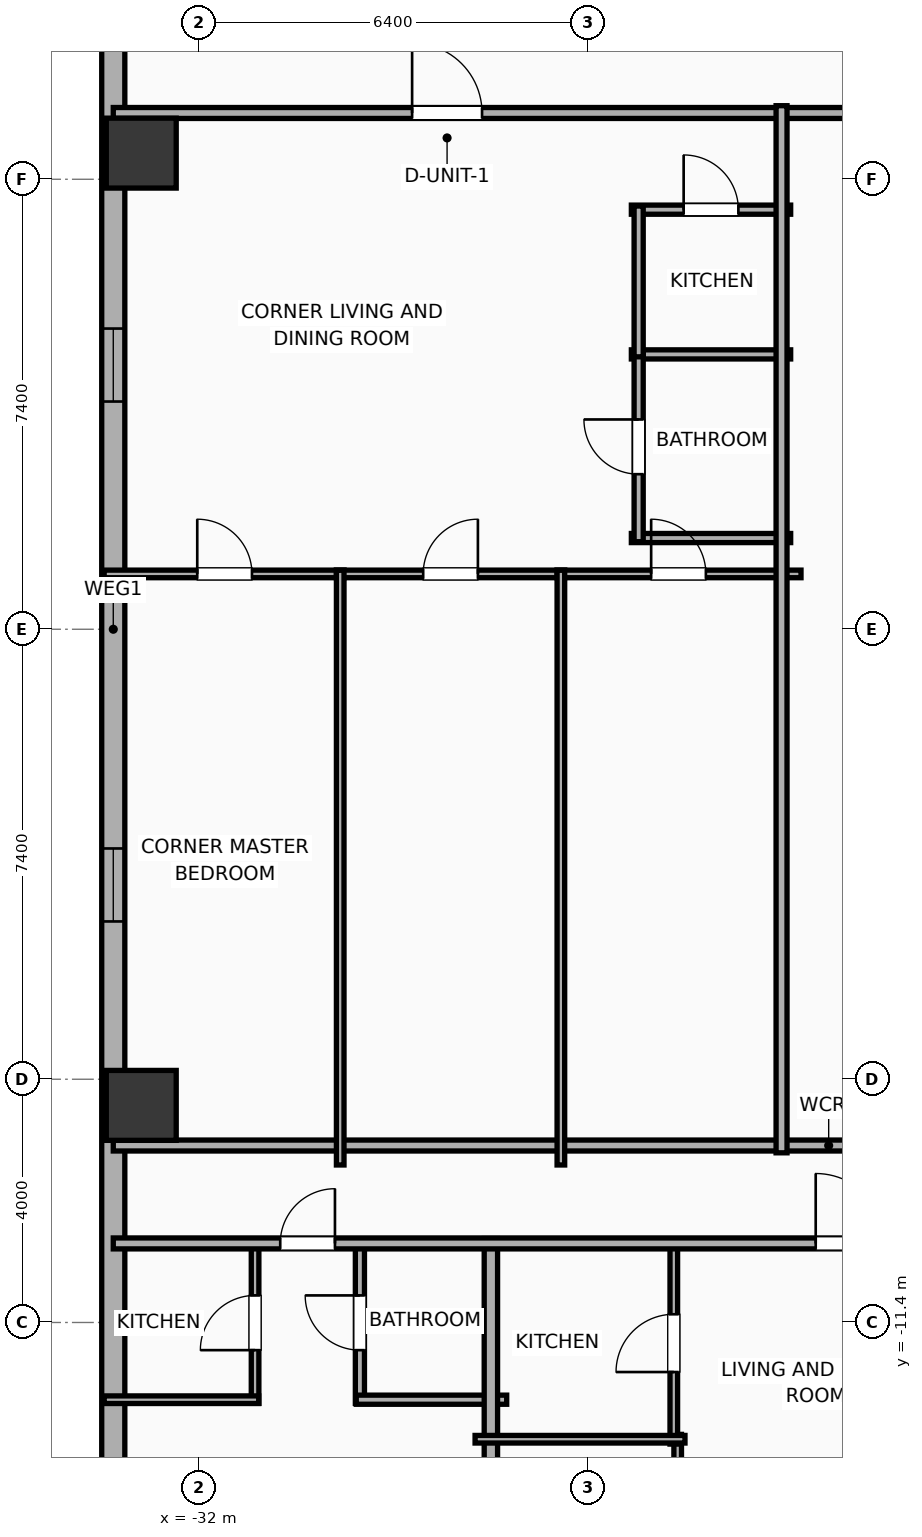
"""IFC4 building model, lengths in metres.
Left out: names, types, materials, properties, quantities, classifications, styles, units other than length and angle.
Written with IfcOpenShell. Run it as: python <this file> out.ifc"""

import sys

from ifc_helpers import new_model, si_unit, direction, frame, frame_2d, origin, origin_2d, place, context, subcontext, project, spatial, rectangle, hollow_rectangle, extrude, element, fill, save


model = new_model("IFC4")
c1 = context("Model", 3, precision=1e-05, world=origin(), true_north=direction((0.0, 1.0)))
c2 = subcontext(c1, "Body", "Model", "MODEL_VIEW")
j1 = project(units=[si_unit("LENGTHUNIT", "METRE"), si_unit("PLANEANGLEUNIT", "RADIAN")], contexts=[c1])
p1 = place(None, origin())
s1 = spatial("IfcSite", under=j1, at=p1, CompositionType="ELEMENT")
p2 = place(p1, origin())
s2 = spatial("IfcBuilding", under=s1, at=p2, CompositionType="ELEMENT")
p3 = place(p2, frame((0.0, 0.0, 37.7)))
s3 = spatial("IfcBuildingStorey", under=s2, at=p3, CompositionType="ELEMENT", Elevation=37.7)
for number, where, z_axis, x_axis in (
    (1, (-32.95, 7.83, 0.0), (0.0, 0.0, 1.0), (1.0, 0.0, 0.0)),
    (2, (-32.95, -7.83, 0.0), (0.0, 0.0, 1.0), (1.0, 0.0, 0.0)),
):
    element("IfcColumn", number, at=place(p3, frame(where, z_axis=z_axis, x_axis=x_axis)), inside=s3, PredefinedType="COLUMN", context=c2, shape_type="SweptSolid", body=[
        extrude(hollow_rectangle(XDim=1.15, YDim=1.15, WallThickness=0.04, at=origin_2d()), origin(), (0.0, 0.0, 1.0), 3.9),
    ])
p4 = place(p3, frame((-33.41, -18.381, 0.0), z_axis=(0.0, 0.0, 1.0), x_axis=(0.0, 1.0, 0.0)))
e3 = element("IfcWall", 3, at=p4, inside=s3, PredefinedType="ELEMENTEDWALL", context=c2, shape_type="SweptSolid", body=[
    extrude(rectangle(XDim=36.763, YDim=0.38, at=frame_2d((18.381, 0.0))), origin(), (0.0, 0.0, 1.0), 3.65),
])
p5 = place(p4, frame((33.187, 0.0, 0.75)))
e4 = element("IfcOpeningElement", 4, at=p5, cuts=e3, PredefinedType="OPENING", context=c2, shape_type="SweptSolid", body=[
    extrude(rectangle(XDim=1.2, YDim=2.05, at=frame_2d((0.6, 1.025))), frame((0.0, 0.2, 0.0), z_axis=(0.0, -1.0, 0.0), x_axis=(1.0, 0.0, 0.0)), (0.0, 0.0, 1.0), 0.4),
])
p6 = place(p4, frame((22.126, 0.0, 0.75)))
e5 = element("IfcOpeningElement", 5, at=p6, cuts=e3, PredefinedType="OPENING", context=c2, shape_type="SweptSolid", body=[
    extrude(rectangle(XDim=1.2, YDim=2.05, at=frame_2d((0.6, 1.025))), frame((0.0, 0.2, 0.0), z_axis=(0.0, -1.0, 0.0), x_axis=(1.0, 0.0, 0.0)), (0.0, 0.0, 1.0), 0.4),
])
p7 = place(p4, frame((13.576, 0.0, 0.75)))
e6 = element("IfcOpeningElement", 6, at=p7, cuts=e3, PredefinedType="OPENING", context=c2, shape_type="SweptSolid", body=[
    extrude(rectangle(XDim=1.2, YDim=2.05, at=frame_2d((0.6, 1.025))), frame((0.0, 0.2, 0.0), z_axis=(0.0, -1.0, 0.0), x_axis=(1.0, 0.0, 0.0)), (0.0, 0.0, 1.0), 0.4),
])
p8 = place(p3, frame((-33.41, 8.49, 0.0), z_axis=(0.0, 0.0, 1.0), x_axis=(1.0, 0.0, 0.0)))
e7 = element("IfcWall", 7, at=p8, inside=s3, PredefinedType="PARTITIONING", context=c2, shape_type="SweptSolid", body=[
    extrude(rectangle(XDim=23.53, YDim=0.18, at=frame_2d((11.765, 0.0))), origin(), (0.0, 0.0, 1.0), 3.65),
])
p9 = place(p8, frame((4.915, 0.0, 0.0)))
e8 = element("IfcOpeningElement", 8, at=p9, cuts=e7, PredefinedType="OPENING", context=c2, shape_type="SweptSolid", body=[
    extrude(rectangle(XDim=1.15, YDim=2.05, at=frame_2d((0.575, 1.025))), frame((0.0, 0.1, 0.0), z_axis=(0.0, -1.0, 0.0), x_axis=(1.0, 0.0, 0.0)), (0.0, 0.0, 1.0), 0.2),
])
p10 = place(p3, frame((-33.41, -8.49, 0.0), z_axis=(0.0, 0.0, 1.0), x_axis=(1.0, 0.0, 0.0)))
e9 = element("IfcWall", 9, at=p10, inside=s3, PredefinedType="PARTITIONING", context=c2, shape_type="SweptSolid", body=[
    extrude(rectangle(XDim=23.53, YDim=0.18, at=frame_2d((11.765, 0.0))), origin(), (0.0, 0.0, 1.0), 3.65),
])
p11 = place(p3, frame((-31.078, -12.73, 0.0), z_axis=(0.0, 0.0, 1.0), x_axis=(0.0, 1.0, 0.0)))
e10 = element("IfcWall", 10, at=p11, inside=s3, PredefinedType="PARTITIONING", context=c2, shape_type="SweptSolid", body=[
    extrude(rectangle(XDim=2.65, YDim=0.125, at=frame_2d((1.325, 0.0))), origin(), (0.0, 0.0, 1.0), 3.65),
])
p12 = place(p11, frame((0.875, 0.0, 0.0)))
e11 = element("IfcOpeningElement", 11, at=p12, cuts=e10, PredefinedType="OPENING", context=c2, shape_type="SweptSolid", body=[
    extrude(rectangle(XDim=0.9, YDim=2.05, at=frame_2d((0.45, 1.025))), frame((0.0, 0.073, 0.0), z_axis=(0.0, -1.0, 0.0), x_axis=(1.0, 0.0, 0.0)), (0.0, 0.0, 1.0), 0.145),
])
p13 = place(p3, frame((-29.354, -12.73, 0.0), z_axis=(0.0, 0.0, 1.0), x_axis=(0.0, 1.0, 0.0)))
e12 = element("IfcWall", 12, at=p13, inside=s3, PredefinedType="PLUMBINGWALL", context=c2, shape_type="SweptSolid", body=[
    extrude(rectangle(XDim=2.65, YDim=0.15, at=frame_2d((1.325, 0.0))), origin(), (0.0, 0.0, 1.0), 3.65),
])
p14 = place(p13, frame((0.875, 0.0, 0.0)))
e13 = element("IfcOpeningElement", 13, at=p14, cuts=e12, PredefinedType="OPENING", context=c2, shape_type="SweptSolid", body=[
    extrude(rectangle(XDim=0.9, YDim=2.05, at=frame_2d((0.45, 1.025))), frame((0.0, 0.085, 0.0), z_axis=(0.0, -1.0, 0.0), x_axis=(1.0, 0.0, 0.0)), (0.0, 0.0, 1.0), 0.17),
])
p15 = place(p3, frame((-33.56, -12.67, 0.0), z_axis=(0.0, 0.0, 1.0), x_axis=(1.0, 0.0, 0.0)))
e14 = element("IfcWall", 14, at=p15, inside=s3, PredefinedType="PARTITIONING", context=c2, shape_type="SweptSolid", body=[
    extrude(rectangle(XDim=2.542, YDim=0.125, at=frame_2d((1.271, 0.0))), origin(), (0.0, 0.0, 1.0), 3.65),
])
p16 = place(p3, frame((-29.414, -12.67, 0.0), z_axis=(0.0, 0.0, 1.0), x_axis=(1.0, 0.0, 0.0)))
e15 = element("IfcWall", 15, at=p16, inside=s3, PredefinedType="PLUMBINGWALL", context=c2, shape_type="SweptSolid", body=[
    extrude(rectangle(XDim=2.474, YDim=0.15, at=frame_2d((1.237, 0.0))), origin(), (0.0, 0.0, 1.0), 3.65),
])
p17 = place(p3, frame((-27.2, -22.21, 0.0), z_axis=(0.0, 0.0, 1.0), x_axis=(0.0, 1.0, 0.0)))
e16 = element("IfcWall", 16, at=p17, inside=s3, PredefinedType="PARTITIONING", context=c2, shape_type="SweptSolid", body=[
    extrude(rectangle(XDim=12.19, YDim=0.22, at=frame_2d((6.095, 0.0))), origin(), (0.0, 0.0, 1.0), 3.65),
])
p18 = place(p3, frame((-24.128, -22.36, 0.0), z_axis=(0.0, 0.0, 1.0), x_axis=(0.0, 1.0, 0.0)))
e17 = element("IfcWall", 17, at=p18, inside=s3, PredefinedType="PARTITIONING", context=c2, shape_type="SweptSolid", body=[
    extrude(rectangle(XDim=9.12, YDim=0.125, at=frame_2d((4.56, 0.0))), origin(), (0.0, 0.0, 1.0), 3.65),
])
p19 = place(p18, frame((7.186, 0.0, 0.0)))
e18 = element("IfcOpeningElement", 18, at=p19, cuts=e17, PredefinedType="OPENING", context=c2, shape_type="SweptSolid", body=[
    extrude(rectangle(XDim=0.95, YDim=2.05, at=frame_2d((0.475, 1.025))), frame((0.0, 0.073, 0.0), z_axis=(0.0, -1.0, 0.0), x_axis=(1.0, 0.0, 0.0)), (0.0, 0.0, 1.0), 0.145),
])
p20 = place(p3, frame((-24.192, -13.4, 0.0), z_axis=(0.0, 0.0, 1.0), x_axis=(0.0, 1.0, 0.0)))
e19 = element("IfcWall", 19, at=p20, inside=s3, PredefinedType="PARTITIONING", context=c2, shape_type="SweptSolid", body=[
    extrude(rectangle(XDim=3.32, YDim=0.125, at=frame_2d((1.66, 0.0))), origin(), (0.0, 0.0, 1.0), 3.65),
])
p21 = place(p20, frame((1.185, 0.0, 0.0)))
e20 = element("IfcOpeningElement", 20, at=p21, cuts=e19, PredefinedType="OPENING", context=c2, shape_type="SweptSolid", body=[
    extrude(rectangle(XDim=0.95, YDim=2.05, at=frame_2d((0.475, 1.025))), frame((0.0, 0.073, 0.0), z_axis=(0.0, -1.0, 0.0), x_axis=(1.0, 0.0, 0.0)), (0.0, 0.0, 1.0), 0.145),
])
p22 = place(p3, frame((-27.46, -13.32, 0.0), z_axis=(0.0, 0.0, 1.0), x_axis=(1.0, 0.0, 0.0)))
e21 = element("IfcWall", 21, at=p22, inside=s3, PredefinedType="PARTITIONING", context=c2, shape_type="SweptSolid", body=[
    extrude(rectangle(XDim=3.452, YDim=0.125, at=frame_2d((1.726, 0.0))), origin(), (0.0, 0.0, 1.0), 3.65),
])
p23 = place(p3, frame((-33.41, -10.1, 0.0), z_axis=(0.0, 0.0, 1.0), x_axis=(1.0, 0.0, 0.0)))
e22 = element("IfcWall", 22, at=p23, inside=s3, PredefinedType="PARTITIONING", context=c2, shape_type="SweptSolid", body=[
    extrude(rectangle(XDim=59.62, YDim=0.18, at=frame_2d((29.81, 0.0))), origin(), (0.0, 0.0, 1.0), 3.65),
])
p24 = place(p23, frame((2.746, 0.0, 0.0)))
e23 = element("IfcOpeningElement", 23, at=p24, cuts=e22, PredefinedType="OPENING", context=c2, shape_type="SweptSolid", body=[
    extrude(rectangle(XDim=0.9, YDim=2.05, at=frame_2d((0.45, 1.025))), frame((0.0, 0.1, 0.0), z_axis=(0.0, -1.0, 0.0), x_axis=(1.0, 0.0, 0.0)), (0.0, 0.0, 1.0), 0.2),
])
p25 = place(p23, frame((11.552, 0.0, 0.0)))
e24 = element("IfcOpeningElement", 24, at=p25, cuts=e22, PredefinedType="OPENING", context=c2, shape_type="SweptSolid", body=[
    extrude(rectangle(XDim=1.15, YDim=2.05, at=frame_2d((0.575, 1.025))), frame((0.0, 0.1, 0.0), z_axis=(0.0, -1.0, 0.0), x_axis=(1.0, 0.0, 0.0)), (0.0, 0.0, 1.0), 0.2),
])
p26 = place(p23, frame((22.379, 0.0, 0.0)))
e25 = element("IfcOpeningElement", 25, at=p26, cuts=e22, PredefinedType="OPENING", context=c2, shape_type="SweptSolid", body=[
    extrude(rectangle(XDim=1.15, YDim=2.05, at=frame_2d((0.575, 1.025))), frame((0.0, 0.1, 0.0), z_axis=(0.0, -1.0, 0.0), x_axis=(1.0, 0.0, 0.0)), (0.0, 0.0, 1.0), 0.2),
])
p27 = place(p23, frame((31.28, 0.0, 0.0)))
e26 = element("IfcOpeningElement", 26, at=p27, cuts=e22, PredefinedType="OPENING", context=c2, shape_type="SweptSolid", body=[
    extrude(rectangle(XDim=1.15, YDim=2.05, at=frame_2d((0.575, 1.025))), frame((0.0, 0.1, 0.0), z_axis=(0.0, -1.0, 0.0), x_axis=(1.0, 0.0, 0.0)), (0.0, 0.0, 1.0), 0.2),
])
p28 = place(p23, frame((36.02, 0.0, 0.0)))
e27 = element("IfcOpeningElement", 27, at=p28, cuts=e22, PredefinedType="OPENING", context=c2, shape_type="SweptSolid", body=[
    extrude(rectangle(XDim=0.9, YDim=2.05, at=frame_2d((0.45, 1.025))), frame((0.0, 0.1, 0.0), z_axis=(0.0, -1.0, 0.0), x_axis=(1.0, 0.0, 0.0)), (0.0, 0.0, 1.0), 0.2),
])
p29 = place(p23, frame((40.044, 0.0, 0.0)))
e28 = element("IfcOpeningElement", 28, at=p29, cuts=e22, PredefinedType="OPENING", context=c2, shape_type="SweptSolid", body=[
    extrude(rectangle(XDim=1.15, YDim=2.05, at=frame_2d((0.575, 1.025))), frame((0.0, 0.1, 0.0), z_axis=(0.0, -1.0, 0.0), x_axis=(1.0, 0.0, 0.0)), (0.0, 0.0, 1.0), 0.2),
])
p30 = place(p23, frame((45.613, 0.0, 0.0)))
e29 = element("IfcOpeningElement", 29, at=p30, cuts=e22, PredefinedType="OPENING", context=c2, shape_type="SweptSolid", body=[
    extrude(rectangle(XDim=1.15, YDim=2.05, at=frame_2d((0.575, 1.025))), frame((0.0, 0.1, 0.0), z_axis=(0.0, -1.0, 0.0), x_axis=(1.0, 0.0, 0.0)), (0.0, 0.0, 1.0), 0.2),
])
p31 = place(p23, frame((54.174, 0.0, 0.0)))
e30 = element("IfcOpeningElement", 30, at=p31, cuts=e22, PredefinedType="OPENING", context=c2, shape_type="SweptSolid", body=[
    extrude(rectangle(XDim=1.15, YDim=2.05, at=frame_2d((0.575, 1.025))), frame((0.0, 0.1, 0.0), z_axis=(0.0, -1.0, 0.0), x_axis=(1.0, 0.0, 0.0)), (0.0, 0.0, 1.0), 0.2),
])
p32 = place(p3, frame((-24.89, 6.9, 0.0), z_axis=(0.0, 0.0, 1.0), x_axis=(1.0, 0.0, 0.0)))
e31 = element("IfcWall", 31, at=p32, inside=s3, PredefinedType="PLUMBINGWALL", context=c2, shape_type="SweptSolid", body=[
    extrude(rectangle(XDim=2.62, YDim=0.15, at=frame_2d((1.31, 0.0))), origin(), (0.0, 0.0, 1.0), 3.65),
])
p33 = place(p32, frame((0.86, 0.0, 0.0)))
e32 = element("IfcOpeningElement", 32, at=p33, cuts=e31, PredefinedType="OPENING", context=c2, shape_type="SweptSolid", body=[
    extrude(rectangle(XDim=0.9, YDim=2.05, at=frame_2d((0.45, 1.025))), frame((0.0, 0.085, 0.0), z_axis=(0.0, -1.0, 0.0), x_axis=(1.0, 0.0, 0.0)), (0.0, 0.0, 1.0), 0.17),
])
for number, where, z_axis, x_axis in (
    (33, (-24.89, 4.52, 0.0), (0.0, 0.0, 1.0), (1.0, 0.0, 0.0)),
    (34, (-24.89, 1.5, 0.0), (0.0, 0.0, 1.0), (1.0, 0.0, 0.0)),
):
    element("IfcWall", number, at=place(p3, frame(where, z_axis=z_axis, x_axis=x_axis)), inside=s3, PredefinedType="PLUMBINGWALL", context=c2, shape_type="SweptSolid", body=[
        extrude(rectangle(XDim=2.62, YDim=0.15, at=frame_2d((1.31, 0.0))), origin(), (0.0, 0.0, 1.0), 3.65),
    ])
p34 = place(p3, frame((-24.77, 1.44, 0.0), z_axis=(0.0, 0.0, 1.0), x_axis=(0.0, 1.0, 0.0)))
e35 = element("IfcWall", 35, at=p34, inside=s3, PredefinedType="PLUMBINGWALL", context=c2, shape_type="SweptSolid", body=[
    extrude(rectangle(XDim=3.12, YDim=0.15, at=frame_2d((1.56, 0.0))), origin(), (0.0, 0.0, 1.0), 3.65),
])
p35 = place(p34, frame((1.11, 0.0, 0.0)))
e36 = element("IfcOpeningElement", 36, at=p35, cuts=e35, PredefinedType="OPENING", context=c2, shape_type="SweptSolid", body=[
    extrude(rectangle(XDim=0.9, YDim=2.05, at=frame_2d((0.45, 1.025))), frame((0.0, 0.085, 0.0), z_axis=(0.0, -1.0, 0.0), x_axis=(1.0, 0.0, 0.0)), (0.0, 0.0, 1.0), 0.17),
])
p36 = place(p3, frame((-24.77, 4.48, 0.0), z_axis=(0.0, 0.0, 1.0), x_axis=(0.0, 1.0, 0.0)))
e37 = element("IfcWall", 37, at=p36, inside=s3, PredefinedType="PLUMBINGWALL", context=c2, shape_type="SweptSolid", body=[
    extrude(rectangle(XDim=2.48, YDim=0.15, at=frame_2d((1.24, 0.0))), origin(), (0.0, 0.0, 1.0), 3.65),
])
p37 = place(p3, frame((-33.56, 0.91, 0.0), z_axis=(0.0, 0.0, 1.0), x_axis=(1.0, 0.0, 0.0)))
e38 = element("IfcWall", 38, at=p37, inside=s3, PredefinedType="PARTITIONING", context=c2, shape_type="SweptSolid", body=[
    extrude(rectangle(XDim=3.945, YDim=0.125, at=frame_2d((1.972, 0.0))), origin(), (0.0, 0.0, 1.0), 3.65),
])
p38 = place(p37, frame((1.531, 0.0, 0.0)))
e39 = element("IfcOpeningElement", 39, at=p38, cuts=e38, PredefinedType="OPENING", context=c2, shape_type="SweptSolid", body=[
    extrude(rectangle(XDim=0.9, YDim=2.05, at=frame_2d((0.45, 1.025))), frame((0.0, 0.073, 0.0), z_axis=(0.0, -1.0, 0.0), x_axis=(1.0, 0.0, 0.0)), (0.0, 0.0, 1.0), 0.145),
])
p39 = place(p3, frame((-29.74, 0.91, 0.0), z_axis=(0.0, 0.0, 1.0), x_axis=(1.0, 0.0, 0.0)))
e40 = element("IfcWall", 40, at=p39, inside=s3, PredefinedType="PARTITIONING", context=c2, shape_type="SweptSolid", body=[
    extrude(rectangle(XDim=3.754, YDim=0.125, at=frame_2d((1.877, 0.0))), origin(), (0.0, 0.0, 1.0), 3.65),
])
p40 = place(p39, frame((1.427, 0.0, 0.0)))
e41 = element("IfcOpeningElement", 41, at=p40, cuts=e40, PredefinedType="OPENING", context=c2, shape_type="SweptSolid", body=[
    extrude(rectangle(XDim=0.9, YDim=2.05, at=frame_2d((0.45, 1.025))), frame((0.0, 0.073, 0.0), z_axis=(0.0, -1.0, 0.0), x_axis=(1.0, 0.0, 0.0)), (0.0, 0.0, 1.0), 0.145),
])
p41 = place(p3, frame((-26.112, 0.91, 0.0), z_axis=(0.0, 0.0, 1.0), x_axis=(1.0, 0.0, 0.0)))
e42 = element("IfcWall", 42, at=p41, inside=s3, PredefinedType="PARTITIONING", context=c2, shape_type="SweptSolid", body=[
    extrude(rectangle(XDim=4.011, YDim=0.125, at=frame_2d((2.006, 0.0))), origin(), (0.0, 0.0, 1.0), 3.65),
])
p42 = place(p41, frame((1.547, 0.0, 0.0)))
e43 = element("IfcOpeningElement", 43, at=p42, cuts=e42, PredefinedType="OPENING", context=c2, shape_type="SweptSolid", body=[
    extrude(rectangle(XDim=0.9, YDim=2.05, at=frame_2d((0.45, 1.025))), frame((0.0, 0.073, 0.0), z_axis=(0.0, -1.0, 0.0), x_axis=(1.0, 0.0, 0.0)), (0.0, 0.0, 1.0), 0.145),
])
for number, where, z_axis, x_axis in (
    (44, (-26.049, -8.81, 0.0), (0.0, 0.0, 1.0), (0.0, 1.0, 0.0)),
    (45, (-29.678, -8.81, 0.0), (0.0, 0.0, 1.0), (0.0, 1.0, 0.0)),
):
    element("IfcWall", number, at=place(p3, frame(where, z_axis=z_axis, x_axis=x_axis)), inside=s3, PredefinedType="PARTITIONING", context=c2, shape_type="SweptSolid", body=[
        extrude(rectangle(XDim=9.78, YDim=0.125, at=frame_2d((4.89, 0.0))), origin(), (0.0, 0.0, 1.0), 3.65),
    ])
p43 = place(p3, frame((-22.42, -8.61, 0.0), z_axis=(0.0, 0.0, 1.0), x_axis=(0.0, 1.0, 0.0)))
e46 = element("IfcWall", 46, at=p43, inside=s3, PredefinedType="PARTITIONING", context=c2, shape_type="SweptSolid", body=[
    extrude(rectangle(XDim=17.22, YDim=0.18, at=frame_2d((8.61, 0.0))), origin(), (0.0, 0.0, 1.0), 3.65),
])
p44 = place(p6, origin())
e47 = element("IfcWindow", 47, at=p44, inside=s3, PartitioningType="SINGLE_PANEL", PredefinedType="WINDOW", context=c2, shape_type="SweptSolid", body=[
    extrude(rectangle(XDim=1.2, YDim=2.05, at=frame_2d((0.6, 1.025))), frame((0.0, 0.03, 0.0), z_axis=(0.0, -1.0, 0.0), x_axis=(1.0, 0.0, 0.0)), (0.0, 0.0, 1.0), 0.06),
])
fill(e5, e47)
p45 = place(p7, origin())
e48 = element("IfcWindow", 48, at=p45, inside=s3, PartitioningType="SINGLE_PANEL", PredefinedType="WINDOW", context=c2, shape_type="SweptSolid", body=[
    extrude(rectangle(XDim=1.2, YDim=2.05, at=frame_2d((0.6, 1.025))), frame((0.0, 0.03, 0.0), z_axis=(0.0, -1.0, 0.0), x_axis=(1.0, 0.0, 0.0)), (0.0, 0.0, 1.0), 0.06),
])
fill(e6, e48)
p46 = place(p9, origin())
e49 = element("IfcDoor", 49, at=p46, inside=s3, OperationType="SINGLE_SWING_LEFT", PredefinedType="DOOR", context=c2, shape_type="SweptSolid", body=[
    extrude(rectangle(XDim=1.15, YDim=2.05, at=frame_2d((0.575, 1.025))), frame((0.0, 0.025, 0.0), z_axis=(0.0, -1.0, 0.0), x_axis=(1.0, 0.0, 0.0)), (0.0, 0.0, 1.0), 0.05),
])
fill(e8, e49)
p47 = place(p12, origin())
e50 = element("IfcDoor", 50, at=p47, inside=s3, OperationType="SINGLE_SWING_LEFT", PredefinedType="DOOR", context=c2, shape_type="SweptSolid", body=[
    extrude(rectangle(XDim=0.9, YDim=2.05, at=frame_2d((0.45, 1.025))), frame((0.0, 0.025, 0.0), z_axis=(0.0, -1.0, 0.0), x_axis=(1.0, 0.0, 0.0)), (0.0, 0.0, 1.0), 0.05),
])
fill(e11, e50)
p48 = place(p14, origin())
e51 = element("IfcDoor", 51, at=p48, inside=s3, OperationType="SINGLE_SWING_RIGHT", PredefinedType="DOOR", context=c2, shape_type="SweptSolid", body=[
    extrude(rectangle(XDim=0.9, YDim=2.05, at=frame_2d((0.45, 1.025))), frame((0.0, 0.025, 0.0), z_axis=(0.0, -1.0, 0.0), x_axis=(1.0, 0.0, 0.0)), (0.0, 0.0, 1.0), 0.05),
])
fill(e13, e51)
p49 = place(p21, origin())
e52 = element("IfcDoor", 52, at=p49, inside=s3, OperationType="SINGLE_SWING_LEFT", PredefinedType="DOOR", context=c2, shape_type="SweptSolid", body=[
    extrude(rectangle(XDim=0.95, YDim=2.05, at=frame_2d((0.475, 1.025))), frame((0.0, 0.025, 0.0), z_axis=(0.0, -1.0, 0.0), x_axis=(1.0, 0.0, 0.0)), (0.0, 0.0, 1.0), 0.05),
])
fill(e20, e52)
p50 = place(p24, origin())
e53 = element("IfcDoor", 53, at=p50, inside=s3, OperationType="SINGLE_SWING_RIGHT", PredefinedType="DOOR", context=c2, shape_type="SweptSolid", body=[
    extrude(rectangle(XDim=0.9, YDim=2.05, at=frame_2d((0.45, 1.025))), frame((0.0, 0.025, 0.0), z_axis=(0.0, -1.0, 0.0), x_axis=(1.0, 0.0, 0.0)), (0.0, 0.0, 1.0), 0.05),
])
fill(e23, e53)
p51 = place(p25, origin())
e54 = element("IfcDoor", 54, at=p51, inside=s3, OperationType="SINGLE_SWING_LEFT", PredefinedType="DOOR", context=c2, shape_type="SweptSolid", body=[
    extrude(rectangle(XDim=1.15, YDim=2.05, at=frame_2d((0.575, 1.025))), frame((0.0, 0.025, 0.0), z_axis=(0.0, -1.0, 0.0), x_axis=(1.0, 0.0, 0.0)), (0.0, 0.0, 1.0), 0.05),
])
fill(e24, e54)
p52 = place(p33, origin())
e55 = element("IfcDoor", 55, at=p52, inside=s3, OperationType="SINGLE_SWING_LEFT", PredefinedType="DOOR", context=c2, shape_type="SweptSolid", body=[
    extrude(rectangle(XDim=0.9, YDim=2.05, at=frame_2d((0.45, 1.025))), frame((0.0, 0.025, 0.0), z_axis=(0.0, -1.0, 0.0), x_axis=(1.0, 0.0, 0.0)), (0.0, 0.0, 1.0), 0.05),
])
fill(e32, e55)
p53 = place(p35, origin())
e56 = element("IfcDoor", 56, at=p53, inside=s3, OperationType="SINGLE_SWING_RIGHT", PredefinedType="DOOR", context=c2, shape_type="SweptSolid", body=[
    extrude(rectangle(XDim=0.9, YDim=2.05, at=frame_2d((0.45, 1.025))), frame((0.0, 0.025, 0.0), z_axis=(0.0, -1.0, 0.0), x_axis=(1.0, 0.0, 0.0)), (0.0, 0.0, 1.0), 0.05),
])
fill(e36, e56)
p54 = place(p38, origin())
e57 = element("IfcDoor", 57, at=p54, inside=s3, OperationType="SINGLE_SWING_LEFT", PredefinedType="DOOR", context=c2, shape_type="SweptSolid", body=[
    extrude(rectangle(XDim=0.9, YDim=2.05, at=frame_2d((0.45, 1.025))), frame((0.0, 0.025, 0.0), z_axis=(0.0, -1.0, 0.0), x_axis=(1.0, 0.0, 0.0)), (0.0, 0.0, 1.0), 0.05),
])
fill(e39, e57)
p55 = place(p40, origin())
e58 = element("IfcDoor", 58, at=p55, inside=s3, OperationType="SINGLE_SWING_RIGHT", PredefinedType="DOOR", context=c2, shape_type="SweptSolid", body=[
    extrude(rectangle(XDim=0.9, YDim=2.05, at=frame_2d((0.45, 1.025))), frame((0.0, 0.025, 0.0), z_axis=(0.0, -1.0, 0.0), x_axis=(1.0, 0.0, 0.0)), (0.0, 0.0, 1.0), 0.05),
])
fill(e41, e58)
p56 = place(p42, origin())
e59 = element("IfcDoor", 59, at=p56, inside=s3, OperationType="SINGLE_SWING_LEFT", PredefinedType="DOOR", context=c2, shape_type="SweptSolid", body=[
    extrude(rectangle(XDim=0.9, YDim=2.05, at=frame_2d((0.45, 1.025))), frame((0.0, 0.025, 0.0), z_axis=(0.0, -1.0, 0.0), x_axis=(1.0, 0.0, 0.0)), (0.0, 0.0, 1.0), 0.05),
])
fill(e43, e59)
save(model, sys.argv[1])
